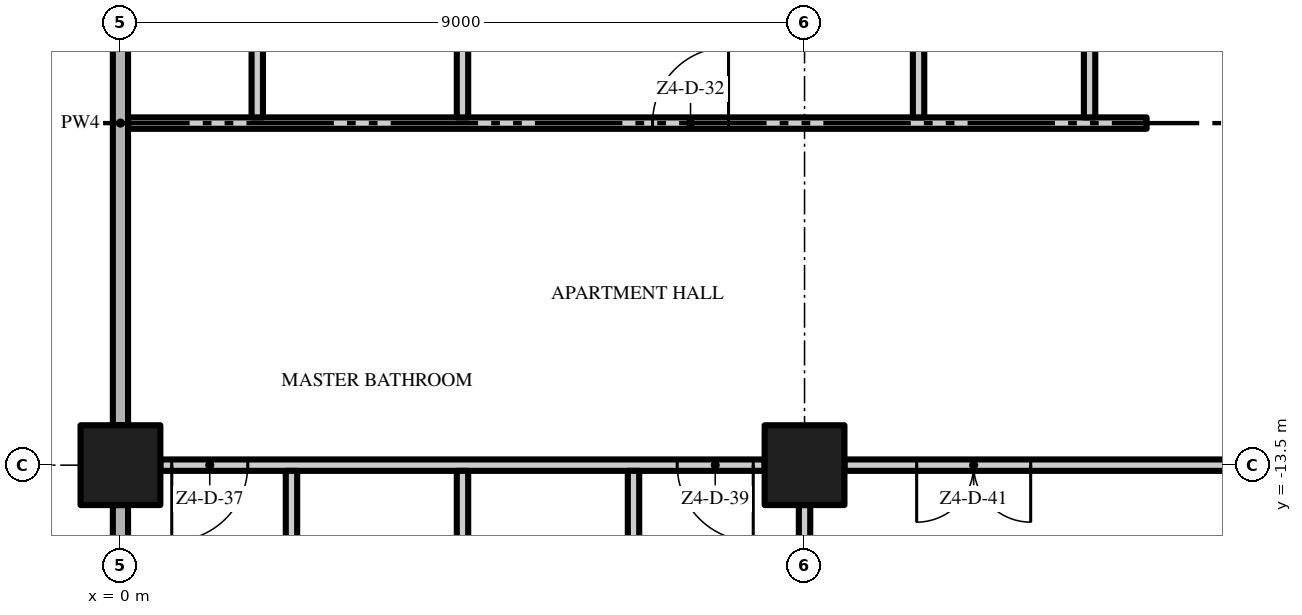
"""IFC4 building model, lengths in metres.
Left out: names, types, materials, properties, quantities, classifications, styles, units other than length and angle.
Written with IfcOpenShell. Run it as: python <this file> out.ifc"""

import sys

from ifc_helpers import new_model, si_unit, direction, frame, frame_2d, origin, origin_2d, place, context, subcontext, project, spatial, rectangle, extrude, element, fill, save


model = new_model("IFC4")
c1 = context("Model", 3, precision=1e-05, world=origin(), true_north=direction((0.0, 1.0)))
c2 = subcontext(c1, "Body", "Model", "MODEL_VIEW")
j1 = project(units=[si_unit("LENGTHUNIT", "METRE"), si_unit("PLANEANGLEUNIT", "RADIAN")], contexts=[c1])
p1 = place(None, origin())
s1 = spatial("IfcSite", under=j1, at=p1, CompositionType="ELEMENT")
p2 = place(p1, origin())
s2 = spatial("IfcBuilding", under=s1, at=p2, CompositionType="ELEMENT")
p3 = place(p2, frame((0.0, 0.0, 218.6)))
s3 = spatial("IfcBuildingStorey", under=s2, at=p3, CompositionType="ELEMENT", Elevation=218.6)
for number, where, z_axis, x_axis in (
    (1, (0.0, -13.5, 0.0), (0.0, 0.0, 1.0), (1.0, 0.0, 0.0)),
    (2, (9.0, -13.5, 0.0), (0.0, 0.0, 1.0), (1.0, 0.0, 0.0)),
):
    element("IfcColumn", number, at=place(p3, frame(where, z_axis=z_axis, x_axis=x_axis)), inside=s3, PredefinedType="COLUMN", context=c2, shape_type="SweptSolid", body=[
        extrude(rectangle(XDim=1.05, YDim=1.05, at=origin_2d()), origin(), (0.0, 0.0, 1.0), 3.5),
    ])
p4 = place(p3, frame((8.475, -13.5, 0.0), z_axis=(0.0, 0.0, 1.0), x_axis=(-1.0, 0.0, 0.0)))
e3 = element("IfcWall", 3, at=p4, inside=s3, PredefinedType="PARTITIONING", context=c2, shape_type="SweptSolid", body=[
    extrude(rectangle(XDim=7.95, YDim=0.15, at=frame_2d((3.975, 0.0))), origin(), (0.0, 0.0, 1.0), 3.5),
])
p5 = place(p4, frame((6.8, 0.0, 0.0)))
e4 = element("IfcOpeningElement", 4, at=p5, cuts=e3, PredefinedType="OPENING", context=c2, shape_type="SweptSolid", body=[
    extrude(rectangle(XDim=1.0, YDim=2.4, at=frame_2d((0.5, 1.2))), frame((0.0, 0.085, 0.0), z_axis=(0.0, -1.0, 0.0), x_axis=(1.0, 0.0, 0.0)), (0.0, 0.0, 1.0), 0.17),
])
p6 = place(p4, frame((0.15, 0.0, 0.0)))
e5 = element("IfcOpeningElement", 5, at=p6, cuts=e3, PredefinedType="OPENING", context=c2, shape_type="SweptSolid", body=[
    extrude(rectangle(XDim=1.0, YDim=2.4, at=frame_2d((0.5, 1.2))), frame((0.0, 0.085, 0.0), z_axis=(0.0, -1.0, 0.0), x_axis=(1.0, 0.0, 0.0)), (0.0, 0.0, 1.0), 0.17),
])
p7 = place(p3, frame((17.475, -13.5, 0.0), z_axis=(0.0, 0.0, 1.0), x_axis=(-1.0, 0.0, 0.0)))
e6 = element("IfcWall", 6, at=p7, inside=s3, PredefinedType="PARTITIONING", context=c2, shape_type="SweptSolid", body=[
    extrude(rectangle(XDim=7.95, YDim=0.15, at=frame_2d((3.975, 0.0))), origin(), (0.0, 0.0, 1.0), 3.5),
])
p8 = place(p7, frame((5.5, 0.0, 0.0)))
e7 = element("IfcOpeningElement", 7, at=p8, cuts=e6, PredefinedType="OPENING", context=c2, shape_type="SweptSolid", body=[
    extrude(rectangle(XDim=1.5, YDim=2.4, at=frame_2d((0.75, 1.2))), frame((0.0, 0.085, 0.0), z_axis=(0.0, -1.0, 0.0), x_axis=(1.0, 0.0, 0.0)), (0.0, 0.0, 1.0), 0.17),
])
p9 = place(p3, frame((0.1, -9.0, 0.0), z_axis=(0.0, 0.0, 1.0), x_axis=(1.0, 0.0, 0.0)))
e8 = element("IfcWall", 8, at=p9, inside=s3, PredefinedType="PARTITIONING", context=c2, shape_type="SweptSolid", body=[
    extrude(rectangle(XDim=13.4, YDim=0.15, at=frame_2d((6.7, 0.0))), origin(), (0.0, 0.0, 1.0), 3.5),
])
p10 = place(p9, frame((6.9, 0.0, 0.0)))
e9 = element("IfcOpeningElement", 9, at=p10, cuts=e8, PredefinedType="OPENING", context=c2, shape_type="SweptSolid", body=[
    extrude(rectangle(XDim=1.0, YDim=2.4, at=frame_2d((0.5, 1.2))), frame((0.0, 0.085, 0.0), z_axis=(0.0, -1.0, 0.0), x_axis=(1.0, 0.0, 0.0)), (0.0, 0.0, 1.0), 0.17),
])
p11 = place(p3, frame((0.0, -21.55, 0.0), z_axis=(0.0, 0.0, 1.0), x_axis=(0.0, 1.0, 0.0)))
e10 = element("IfcWall", 10, at=p11, inside=s3, PredefinedType="PARTITIONING", context=c2, shape_type="SweptSolid", body=[
    extrude(rectangle(XDim=7.525, YDim=0.2, at=frame_2d((3.763, 0.0))), origin(), (0.0, 0.0, 1.0), 3.5),
])
p12 = place(p3, frame((0.0, -12.975, 0.0), z_axis=(0.0, 0.0, 1.0), x_axis=(0.0, 1.0, 0.0)))
e11 = element("IfcWall", 11, at=p12, inside=s3, PredefinedType="PARTITIONING", context=c2, shape_type="SweptSolid", body=[
    extrude(rectangle(XDim=7.95, YDim=0.2, at=frame_2d((3.975, 0.0))), origin(), (0.0, 0.0, 1.0), 3.5),
])
p13 = place(p3, frame((1.8, -8.925, 0.0), z_axis=(0.0, 0.0, 1.0), x_axis=(0.0, 1.0, 0.0)))
e12 = element("IfcWall", 12, at=p13, inside=s3, PredefinedType="PARTITIONING", context=c2, shape_type="SweptSolid", body=[
    extrude(rectangle(XDim=4.35, YDim=0.15, at=frame_2d((2.175, 0.0))), origin(), (0.0, 0.0, 1.0), 3.5),
])
p14 = place(p3, frame((2.25, -16.575, 0.0), z_axis=(0.0, 0.0, 1.0), x_axis=(0.0, 1.0, 0.0)))
e13 = element("IfcWall", 13, at=p14, inside=s3, PredefinedType="PARTITIONING", context=c2, shape_type="SweptSolid", body=[
    extrude(rectangle(XDim=3.0, YDim=0.15, at=frame_2d((1.5, 0.0))), origin(), (0.0, 0.0, 1.0), 3.5),
])
p15 = place(p3, frame((4.5, -22.2, 0.0), z_axis=(0.0, 0.0, 1.0), x_axis=(0.0, 1.0, 0.0)))
e14 = element("IfcWall", 14, at=p15, inside=s3, PredefinedType="PARTITIONING", context=c2, shape_type="SweptSolid", body=[
    extrude(rectangle(XDim=8.625, YDim=0.15, at=frame_2d((4.312, 0.0))), origin(), (0.0, 0.0, 1.0), 3.5),
])
p16 = place(p3, frame((4.5, -8.925, 0.0), z_axis=(0.0, 0.0, 1.0), x_axis=(0.0, 1.0, 0.0)))
e15 = element("IfcWall", 15, at=p16, inside=s3, PredefinedType="PARTITIONING", context=c2, shape_type="SweptSolid", body=[
    extrude(rectangle(XDim=4.35, YDim=0.15, at=frame_2d((2.175, 0.0))), origin(), (0.0, 0.0, 1.0), 3.5),
])
p17 = place(p3, frame((6.75, -16.575, 0.0), z_axis=(0.0, 0.0, 1.0), x_axis=(0.0, 1.0, 0.0)))
e16 = element("IfcWall", 16, at=p17, inside=s3, PredefinedType="PARTITIONING", context=c2, shape_type="SweptSolid", body=[
    extrude(rectangle(XDim=3.0, YDim=0.15, at=frame_2d((1.5, 0.0))), origin(), (0.0, 0.0, 1.0), 3.5),
])
p18 = place(p3, frame((9.0, -21.55, 0.0), z_axis=(0.0, 0.0, 1.0), x_axis=(0.0, 1.0, 0.0)))
e17 = element("IfcWall", 17, at=p18, inside=s3, PredefinedType="PARTITIONING", context=c2, shape_type="SweptSolid", body=[
    extrude(rectangle(XDim=7.525, YDim=0.15, at=frame_2d((3.763, 0.0))), origin(), (0.0, 0.0, 1.0), 3.5),
])
p19 = place(p3, frame((10.5, -8.925, 0.0), z_axis=(0.0, 0.0, 1.0), x_axis=(0.0, 1.0, 0.0)))
e18 = element("IfcWall", 18, at=p19, inside=s3, PredefinedType="PARTITIONING", context=c2, shape_type="SweptSolid", body=[
    extrude(rectangle(XDim=4.35, YDim=0.15, at=frame_2d((2.175, 0.0))), origin(), (0.0, 0.0, 1.0), 3.5),
])
p20 = place(p3, frame((12.75, -8.925, 0.0), z_axis=(0.0, 0.0, 1.0), x_axis=(0.0, 1.0, 0.0)))
e19 = element("IfcWall", 19, at=p20, inside=s3, PredefinedType="PARTITIONING", context=c2, shape_type="SweptSolid", body=[
    extrude(rectangle(XDim=4.5, YDim=0.15, at=frame_2d((2.25, 0.0))), origin(), (0.0, 0.0, 1.0), 3.5),
])
p21 = place(p20, frame((1.75, 0.0, 0.0)))
e20 = element("IfcOpeningElement", 20, at=p21, cuts=e19, PredefinedType="OPENING", context=c2, shape_type="SweptSolid", body=[
    extrude(rectangle(XDim=0.9, YDim=2.1, at=frame_2d((0.45, 1.05))), frame((0.0, 0.085, 0.0), z_axis=(0.0, -1.0, 0.0), x_axis=(1.0, 0.0, 0.0)), (0.0, 0.0, 1.0), 0.17),
])
p22 = place(p10, origin())
e21 = element("IfcDoor", 21, at=p22, inside=s3, OperationType="SINGLE_SWING_RIGHT", PredefinedType="DOOR", context=c2, shape_type="SweptSolid", body=[
    extrude(rectangle(XDim=1.0, YDim=2.4, at=frame_2d((0.5, 1.2))), frame((0.0, 0.025, 0.0), z_axis=(0.0, -1.0, 0.0), x_axis=(1.0, 0.0, 0.0)), (0.0, 0.0, 1.0), 0.05),
])
fill(e9, e21)
p23 = place(p5, origin())
e22 = element("IfcDoor", 22, at=p23, inside=s3, OperationType="SINGLE_SWING_RIGHT", PredefinedType="DOOR", context=c2, shape_type="SweptSolid", body=[
    extrude(rectangle(XDim=1.0, YDim=2.4, at=frame_2d((0.5, 1.2))), frame((0.0, 0.025, 0.0), z_axis=(0.0, -1.0, 0.0), x_axis=(1.0, 0.0, 0.0)), (0.0, 0.0, 1.0), 0.05),
])
fill(e4, e22)
p24 = place(p6, origin())
e23 = element("IfcDoor", 23, at=p24, inside=s3, OperationType="SINGLE_SWING_LEFT", PredefinedType="DOOR", context=c2, shape_type="SweptSolid", body=[
    extrude(rectangle(XDim=1.0, YDim=2.4, at=frame_2d((0.5, 1.2))), frame((0.0, 0.025, 0.0), z_axis=(0.0, -1.0, 0.0), x_axis=(1.0, 0.0, 0.0)), (0.0, 0.0, 1.0), 0.05),
])
fill(e5, e23)
p25 = place(p8, origin())
e24 = element("IfcDoor", 24, at=p25, inside=s3, OperationType="DOUBLE_DOOR_SINGLE_SWING", PredefinedType="DOOR", context=c2, shape_type="SweptSolid", body=[
    extrude(rectangle(XDim=1.5, YDim=2.4, at=frame_2d((0.75, 1.2))), frame((0.0, 0.025, 0.0), z_axis=(0.0, -1.0, 0.0), x_axis=(1.0, 0.0, 0.0)), (0.0, 0.0, 1.0), 0.05),
])
fill(e7, e24)
save(model, sys.argv[1])
